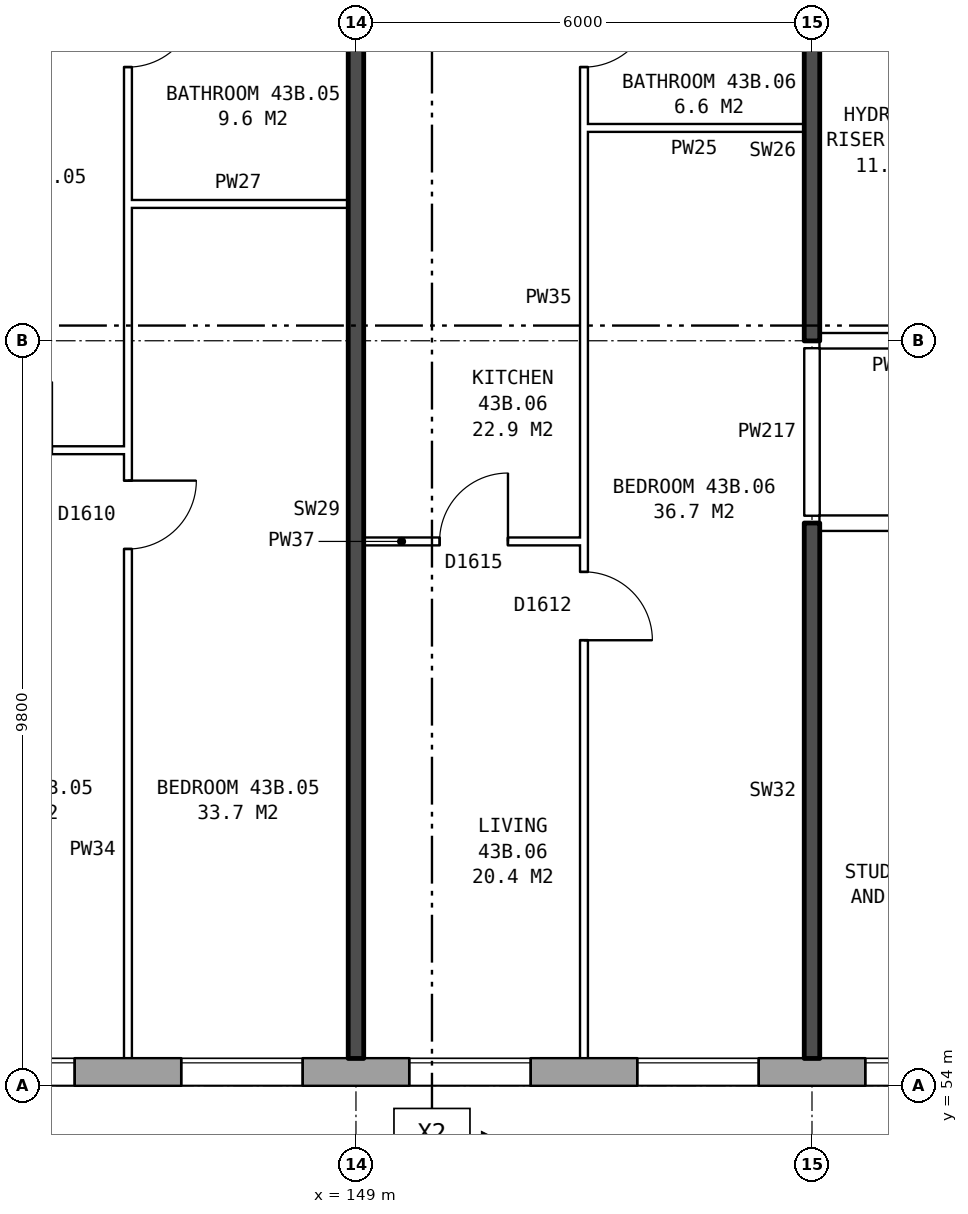
"""IFC4 building model, lengths in metres.
Left out: names, types, materials, properties, quantities, classifications, styles, units other than length and angle.
Written with IfcOpenShell. Run it as: python <this file> out.ifc"""

import sys

from ifc_helpers import new_model, si_unit, direction, frame, frame_2d, origin, place, context, subcontext, project, spatial, rectangle, extrude, element, fill, save


model = new_model("IFC4")
c1 = context("Model", 3, precision=1e-05, world=origin(), true_north=direction((0.0, 1.0)))
c2 = subcontext(c1, "Body", "Model", "MODEL_VIEW")
j1 = project(units=[si_unit("LENGTHUNIT", "METRE"), si_unit("PLANEANGLEUNIT", "RADIAN")], contexts=[c1])
p1 = place(None, origin())
s1 = spatial("IfcSite", under=j1, at=p1, CompositionType="ELEMENT")
p2 = place(p1, origin())
s2 = spatial("IfcBuilding", under=s1, at=p2, CompositionType="ELEMENT")
p3 = place(p2, frame((0.0, 0.0, 154.7)))
s3 = spatial("IfcBuildingStorey", under=s2, at=p3, CompositionType="ELEMENT", Elevation=154.7)
p4 = place(p3, frame((134.075, 54.18, 0.0), z_axis=(0.0, 0.0, 1.0), x_axis=(1.0, 0.0, 0.0)))
e1 = element("IfcWall", 1, at=p4, inside=s3, PredefinedType="STANDARD", context=c2, shape_type="SweptSolid", body=[
    extrude(rectangle(XDim=34.351, YDim=0.36, at=frame_2d((17.175, 0.0))), origin(), (0.0, 0.0, 1.0), 2.85),
])
p5 = place(p4, frame((0.625, 0.0, 0.8)))
e2 = element("IfcOpeningElement", 2, at=p5, cuts=e1, PredefinedType="OPENING", context=c2, shape_type="SweptSolid", body=[
    extrude(rectangle(XDim=1.6, YDim=1.8, at=frame_2d((0.8, 0.9))), frame((0.0, 0.19, 0.0), z_axis=(0.0, -1.0, 0.0), x_axis=(1.0, 0.0, 0.0)), (0.0, 0.0, 1.0), 0.38),
])
p6 = place(p4, frame((3.125, 0.0, 0.8)))
e3 = element("IfcOpeningElement", 3, at=p6, cuts=e1, PredefinedType="OPENING", context=c2, shape_type="SweptSolid", body=[
    extrude(rectangle(XDim=1.2, YDim=1.8, at=frame_2d((0.6, 0.9))), frame((0.0, 0.19, 0.0), z_axis=(0.0, -1.0, 0.0), x_axis=(1.0, 0.0, 0.0)), (0.0, 0.0, 1.0), 0.38),
])
p7 = place(p4, frame((4.625, 0.0, 1.7)))
e4 = element("IfcOpeningElement", 4, at=p7, cuts=e1, PredefinedType="OPENING", context=c2, shape_type="SweptSolid", body=[
    extrude(rectangle(XDim=0.8, YDim=0.9, at=frame_2d((0.4, 0.45))), frame((0.0, 0.19, 0.0), z_axis=(0.0, -1.0, 0.0), x_axis=(1.0, 0.0, 0.0)), (0.0, 0.0, 1.0), 0.38),
])
p8 = place(p4, frame((9.625, 0.0, 0.8)))
e5 = element("IfcOpeningElement", 5, at=p8, cuts=e1, PredefinedType="OPENING", context=c2, shape_type="SweptSolid", body=[
    extrude(rectangle(XDim=1.6, YDim=1.8, at=frame_2d((0.8, 0.9))), frame((0.0, 0.19, 0.0), z_axis=(0.0, -1.0, 0.0), x_axis=(1.0, 0.0, 0.0)), (0.0, 0.0, 1.0), 0.38),
])
p9 = place(p4, frame((12.625, 0.0, 0.8)))
e6 = element("IfcOpeningElement", 6, at=p9, cuts=e1, PredefinedType="OPENING", context=c2, shape_type="SweptSolid", body=[
    extrude(rectangle(XDim=1.6, YDim=1.8, at=frame_2d((0.8, 0.9))), frame((0.0, 0.19, 0.0), z_axis=(0.0, -1.0, 0.0), x_axis=(1.0, 0.0, 0.0)), (0.0, 0.0, 1.0), 0.38),
])
p10 = place(p4, frame((15.625, 0.0, 0.8)))
e7 = element("IfcOpeningElement", 7, at=p10, cuts=e1, PredefinedType="OPENING", context=c2, shape_type="SweptSolid", body=[
    extrude(rectangle(XDim=1.6, YDim=1.8, at=frame_2d((0.8, 0.9))), frame((0.0, 0.19, 0.0), z_axis=(0.0, -1.0, 0.0), x_axis=(1.0, 0.0, 0.0)), (0.0, 0.0, 1.0), 0.38),
])
p11 = place(p4, frame((18.625, 0.0, 0.8)))
e8 = element("IfcOpeningElement", 8, at=p11, cuts=e1, PredefinedType="OPENING", context=c2, shape_type="SweptSolid", body=[
    extrude(rectangle(XDim=1.6, YDim=1.8, at=frame_2d((0.8, 0.9))), frame((0.0, 0.19, 0.0), z_axis=(0.0, -1.0, 0.0), x_axis=(1.0, 0.0, 0.0)), (0.0, 0.0, 1.0), 0.38),
])
p12 = place(p4, frame((21.625, 0.0, 0.8)))
e9 = element("IfcOpeningElement", 9, at=p12, cuts=e1, PredefinedType="OPENING", context=c2, shape_type="SweptSolid", body=[
    extrude(rectangle(XDim=1.6, YDim=1.8, at=frame_2d((0.8, 0.9))), frame((0.0, 0.19, 0.0), z_axis=(0.0, -1.0, 0.0), x_axis=(1.0, 0.0, 0.0)), (0.0, 0.0, 1.0), 0.38),
])
p13 = place(p4, frame((24.625, 0.0, 0.8)))
e10 = element("IfcOpeningElement", 10, at=p13, cuts=e1, PredefinedType="OPENING", context=c2, shape_type="SweptSolid", body=[
    extrude(rectangle(XDim=1.6, YDim=1.8, at=frame_2d((0.8, 0.9))), frame((0.0, 0.19, 0.0), z_axis=(0.0, -1.0, 0.0), x_axis=(1.0, 0.0, 0.0)), (0.0, 0.0, 1.0), 0.38),
])
p14 = place(p4, frame((27.125, 0.0, 0.8)))
e11 = element("IfcOpeningElement", 11, at=p14, cuts=e1, PredefinedType="OPENING", context=c2, shape_type="SweptSolid", body=[
    extrude(rectangle(XDim=0.6, YDim=0.9, at=frame_2d((0.3, 0.45))), frame((0.0, 0.19, 0.0), z_axis=(0.0, -1.0, 0.0), x_axis=(1.0, 0.0, 0.0)), (0.0, 0.0, 1.0), 0.38),
])
p15 = place(p4, frame((30.625, 0.0, 0.8)))
e12 = element("IfcOpeningElement", 12, at=p15, cuts=e1, PredefinedType="OPENING", context=c2, shape_type="SweptSolid", body=[
    extrude(rectangle(XDim=1.6, YDim=1.8, at=frame_2d((0.8, 0.9))), frame((0.0, 0.19, 0.0), z_axis=(0.0, -1.0, 0.0), x_axis=(1.0, 0.0, 0.0)), (0.0, 0.0, 1.0), 0.38),
])
p16 = place(p4, frame((6.625, 0.0, 0.8)))
e13 = element("IfcOpeningElement", 13, at=p16, cuts=e1, PredefinedType="OPENING", context=c2, shape_type="SweptSolid", body=[
    extrude(rectangle(XDim=0.8, YDim=0.9, at=frame_2d((0.4, 0.45))), frame((0.0, 0.19, 0.0), z_axis=(0.0, -1.0, 0.0), x_axis=(1.0, 0.0, 0.0)), (0.0, 0.0, 1.0), 0.38),
])
p17 = place(p4, frame((7.725, 0.0, 0.8)))
e14 = element("IfcOpeningElement", 14, at=p17, cuts=e1, PredefinedType="OPENING", context=c2, shape_type="SweptSolid", body=[
    extrude(rectangle(XDim=1.0, YDim=1.8, at=frame_2d((0.5, 0.9))), frame((0.0, 0.19, 0.0), z_axis=(0.0, -1.0, 0.0), x_axis=(1.0, 0.0, 0.0)), (0.0, 0.0, 1.0), 0.38),
])
p18 = place(p4, frame((28.925, 0.0, 1.7)))
e15 = element("IfcOpeningElement", 15, at=p18, cuts=e1, PredefinedType="OPENING", context=c2, shape_type="SweptSolid", body=[
    extrude(rectangle(XDim=1.4, YDim=0.9, at=frame_2d((0.7, 0.45))), frame((0.0, 0.19, 0.0), z_axis=(0.0, -1.0, 0.0), x_axis=(1.0, 0.0, 0.0)), (0.0, 0.0, 1.0), 0.38),
])
p19 = place(p3, frame((149.1, 61.16, 0.0), z_axis=(0.0, 0.0, 1.0), x_axis=(1.0, 0.0, 0.0)))
e16 = element("IfcWall", 16, at=p19, inside=s3, PredefinedType="PARTITIONING", context=c2, shape_type="SweptSolid", body=[
    extrude(rectangle(XDim=2.9, YDim=0.1, at=frame_2d((1.45, 0.0))), origin(), (0.0, 0.0, 1.0), 2.85),
])
p20 = place(p19, frame((1.0, 0.0, 0.0)))
e17 = element("IfcOpeningElement", 17, at=p20, cuts=e16, PredefinedType="OPENING", context=c2, shape_type="SweptSolid", body=[
    extrude(rectangle(XDim=0.9, YDim=2.1, at=frame_2d((0.45, 1.05))), frame((0.0, 0.06, 0.0), z_axis=(0.0, -1.0, 0.0), x_axis=(1.0, 0.0, 0.0)), (0.0, 0.0, 1.0), 0.12),
])
p21 = place(p3, frame((155.1, 61.4, 0.0), z_axis=(0.0, 0.0, 1.0), x_axis=(1.0, 0.0, 0.0)))
e18 = element("IfcWall", 18, at=p21, inside=s3, PredefinedType="PARTITIONING", context=c2, shape_type="SweptSolid", body=[
    extrude(rectangle(XDim=16.04, YDim=0.2, at=frame_2d((8.02, 0.0))), origin(), (0.0, 0.0, 1.0), 2.85),
])
p22 = place(p21, frame((1.45, 0.0, 0.0)))
e19 = element("IfcOpeningElement", 19, at=p22, cuts=e18, PredefinedType="OPENING", context=c2, shape_type="SweptSolid", body=[
    extrude(rectangle(XDim=1.0, YDim=2.1, at=frame_2d((0.5, 1.05))), frame((0.0, 0.11, 0.0), z_axis=(0.0, -1.0, 0.0), x_axis=(1.0, 0.0, 0.0)), (0.0, 0.0, 1.0), 0.22),
])
p23 = place(p21, frame((8.4, 0.0, 0.0)))
e20 = element("IfcOpeningElement", 20, at=p23, cuts=e18, PredefinedType="OPENING", context=c2, shape_type="SweptSolid", body=[
    extrude(rectangle(XDim=1.0, YDim=2.1, at=frame_2d((0.5, 1.05))), frame((0.0, 0.11, 0.0), z_axis=(0.0, -1.0, 0.0), x_axis=(1.0, 0.0, 0.0)), (0.0, 0.0, 1.0), 0.22),
])
p24 = place(p3, frame((143.1, 62.36, 0.0), z_axis=(0.0, 0.0, 1.0), x_axis=(1.0, 0.0, 0.0)))
e21 = element("IfcWall", 21, at=p24, inside=s3, PredefinedType="PARTITIONING", context=c2, shape_type="SweptSolid", body=[
    extrude(rectangle(XDim=2.9, YDim=0.1, at=frame_2d((1.45, 0.0))), origin(), (0.0, 0.0, 1.0), 2.85),
])
p25 = place(p24, frame((1.0, 0.0, 0.0)))
e22 = element("IfcOpeningElement", 22, at=p25, cuts=e21, PredefinedType="OPENING", context=c2, shape_type="SweptSolid", body=[
    extrude(rectangle(XDim=0.9, YDim=2.1, at=frame_2d((0.45, 1.05))), frame((0.0, 0.06, 0.0), z_axis=(0.0, -1.0, 0.0), x_axis=(1.0, 0.0, 0.0)), (0.0, 0.0, 1.0), 0.12),
])
p26 = place(p3, frame((155.1, 63.8, 0.0), z_axis=(0.0, 0.0, 1.0), x_axis=(1.0, 0.0, 0.0)))
e23 = element("IfcWall", 23, at=p26, inside=s3, PredefinedType="PARTITIONING", context=c2, shape_type="SweptSolid", body=[
    extrude(rectangle(XDim=2.14, YDim=0.2, at=frame_2d((1.07, 0.0))), origin(), (0.0, 0.0, 1.0), 2.85),
])
for number, where, z_axis, x_axis in (
    (24, (146.0, 65.6, 0.0), (0.0, 0.0, 1.0), (1.0, 0.0, 0.0)),
    (25, (152.0, 66.6, 0.0), (0.0, 0.0, 1.0), (1.0, 0.0, 0.0)),
):
    element("IfcWall", number, at=place(p3, frame(where, z_axis=z_axis, x_axis=x_axis)), inside=s3, PredefinedType="PARTITIONING", context=c2, shape_type="SweptSolid", body=[
        extrude(rectangle(XDim=2.9, YDim=0.1, at=frame_2d((1.45, 0.0))), origin(), (0.0, 0.0, 1.0), 2.85),
    ])
p27 = place(p3, frame((146.0, 54.36, 0.0), z_axis=(0.0, 0.0, 1.0), x_axis=(0.0, 1.0, 0.0)))
e26 = element("IfcWall", 26, at=p27, inside=s3, PredefinedType="PARTITIONING", context=c2, shape_type="SweptSolid", body=[
    extrude(rectangle(XDim=14.34, YDim=0.1, at=frame_2d((7.17, 0.0))), origin(), (0.0, 0.0, 1.0), 2.85),
])
p28 = place(p27, frame((6.7, 0.0, 0.0)))
e27 = element("IfcOpeningElement", 27, at=p28, cuts=e26, PredefinedType="OPENING", context=c2, shape_type="SweptSolid", body=[
    extrude(rectangle(XDim=0.9, YDim=2.1, at=frame_2d((0.45, 1.05))), frame((0.0, 0.06, 0.0), z_axis=(0.0, -1.0, 0.0), x_axis=(1.0, 0.0, 0.0)), (0.0, 0.0, 1.0), 0.12),
])
p29 = place(p27, frame((13.04, 0.0, 0.0)))
e28 = element("IfcOpeningElement", 28, at=p29, cuts=e26, PredefinedType="OPENING", context=c2, shape_type="SweptSolid", body=[
    extrude(rectangle(XDim=0.9, YDim=2.1, at=frame_2d((0.45, 1.05))), frame((0.0, 0.06, 0.0), z_axis=(0.0, -1.0, 0.0), x_axis=(1.0, 0.0, 0.0)), (0.0, 0.0, 1.0), 0.12),
])
p30 = place(p3, frame((149.0, 54.36, 0.0), z_axis=(0.0, 0.0, 1.0), x_axis=(0.0, 1.0, 0.0)))
e29 = element("IfcWall", 29, at=p30, inside=s3, PredefinedType="SOLIDWALL", context=c2, shape_type="SweptSolid", body=[
    extrude(rectangle(XDim=14.44, YDim=0.2, at=frame_2d((7.22, 0.0))), origin(), (0.0, 0.0, 1.0), 2.85),
])
p31 = place(p3, frame((152.0, 54.36, 0.0), z_axis=(0.0, 0.0, 1.0), x_axis=(0.0, 1.0, 0.0)))
e30 = element("IfcWall", 30, at=p31, inside=s3, PredefinedType="PARTITIONING", context=c2, shape_type="SweptSolid", body=[
    extrude(rectangle(XDim=14.34, YDim=0.1, at=frame_2d((7.17, 0.0))), origin(), (0.0, 0.0, 1.0), 2.85),
])
p32 = place(p31, frame((5.5, 0.0, 0.0)))
e31 = element("IfcOpeningElement", 31, at=p32, cuts=e30, PredefinedType="OPENING", context=c2, shape_type="SweptSolid", body=[
    extrude(rectangle(XDim=0.9, YDim=2.1, at=frame_2d((0.45, 1.05))), frame((0.0, 0.06, 0.0), z_axis=(0.0, -1.0, 0.0), x_axis=(1.0, 0.0, 0.0)), (0.0, 0.0, 1.0), 0.12),
])
p33 = place(p31, frame((13.04, 0.0, 0.0)))
e32 = element("IfcOpeningElement", 32, at=p33, cuts=e30, PredefinedType="OPENING", context=c2, shape_type="SweptSolid", body=[
    extrude(rectangle(XDim=0.9, YDim=2.1, at=frame_2d((0.45, 1.05))), frame((0.0, 0.06, 0.0), z_axis=(0.0, -1.0, 0.0), x_axis=(1.0, 0.0, 0.0)), (0.0, 0.0, 1.0), 0.12),
])
p34 = place(p3, frame((155.0, 54.36, 0.0), z_axis=(0.0, 0.0, 1.0), x_axis=(0.0, 1.0, 0.0)))
e33 = element("IfcWall", 33, at=p34, inside=s3, PredefinedType="SOLIDWALL", context=c2, shape_type="SweptSolid", body=[
    extrude(rectangle(XDim=7.04, YDim=0.2, at=frame_2d((3.52, 0.0))), origin(), (0.0, 0.0, 1.0), 2.85),
])
p35 = place(p3, frame((155.0, 61.5, 0.0), z_axis=(0.0, 0.0, 1.0), x_axis=(0.0, 1.0, 0.0)))
e34 = element("IfcWall", 34, at=p35, inside=s3, PredefinedType="PARTITIONING", context=c2, shape_type="SweptSolid", body=[
    extrude(rectangle(XDim=2.2, YDim=0.2, at=frame_2d((1.1, 0.0))), origin(), (0.0, 0.0, 1.0), 2.85),
])
p36 = place(p3, frame((155.0, 63.8, 0.0), z_axis=(0.0, 0.0, 1.0), x_axis=(0.0, 1.0, 0.0)))
e35 = element("IfcWall", 35, at=p36, inside=s3, PredefinedType="SOLIDWALL", context=c2, shape_type="SweptSolid", body=[
    extrude(rectangle(XDim=5.0, YDim=0.2, at=frame_2d((2.5, 0.0))), origin(), (0.0, 0.0, 1.0), 2.85),
])
p37 = place(p8, origin())
e36 = element("IfcWindow", 36, at=p37, inside=s3, PartitioningType="SINGLE_PANEL", PredefinedType="WINDOW", context=c2, shape_type="SweptSolid", body=[
    extrude(rectangle(XDim=1.6, YDim=1.8, at=frame_2d((0.8, 0.9))), frame((0.0, 0.15, 0.0), z_axis=(0.0, -1.0, 0.0), x_axis=(1.0, 0.0, 0.0)), (0.0, 0.0, 1.0), 0.06),
])
fill(e5, e36)
p38 = place(p9, origin())
e37 = element("IfcWindow", 37, at=p38, inside=s3, PartitioningType="SINGLE_PANEL", PredefinedType="WINDOW", context=c2, shape_type="SweptSolid", body=[
    extrude(rectangle(XDim=1.6, YDim=1.8, at=frame_2d((0.8, 0.9))), frame((0.0, 0.15, 0.0), z_axis=(0.0, -1.0, 0.0), x_axis=(1.0, 0.0, 0.0)), (0.0, 0.0, 1.0), 0.06),
])
fill(e6, e37)
p39 = place(p10, origin())
e38 = element("IfcWindow", 38, at=p39, inside=s3, PartitioningType="SINGLE_PANEL", PredefinedType="WINDOW", context=c2, shape_type="SweptSolid", body=[
    extrude(rectangle(XDim=1.6, YDim=1.8, at=frame_2d((0.8, 0.9))), frame((0.0, 0.15, 0.0), z_axis=(0.0, -1.0, 0.0), x_axis=(1.0, 0.0, 0.0)), (0.0, 0.0, 1.0), 0.06),
])
fill(e7, e38)
p40 = place(p11, origin())
e39 = element("IfcWindow", 39, at=p40, inside=s3, PartitioningType="SINGLE_PANEL", PredefinedType="WINDOW", context=c2, shape_type="SweptSolid", body=[
    extrude(rectangle(XDim=1.6, YDim=1.8, at=frame_2d((0.8, 0.9))), frame((0.0, 0.15, 0.0), z_axis=(0.0, -1.0, 0.0), x_axis=(1.0, 0.0, 0.0)), (0.0, 0.0, 1.0), 0.06),
])
fill(e8, e39)
p41 = place(p12, origin())
e40 = element("IfcWindow", 40, at=p41, inside=s3, PartitioningType="SINGLE_PANEL", PredefinedType="WINDOW", context=c2, shape_type="SweptSolid", body=[
    extrude(rectangle(XDim=1.6, YDim=1.8, at=frame_2d((0.8, 0.9))), frame((0.0, 0.15, 0.0), z_axis=(0.0, -1.0, 0.0), x_axis=(1.0, 0.0, 0.0)), (0.0, 0.0, 1.0), 0.06),
])
fill(e9, e40)
p42 = place(p28, frame((0.9, 0.0, 0.0), z_axis=(0.0, 0.0, 1.0), x_axis=(-1.0, 0.0, 0.0)))
e41 = element("IfcDoor", 41, at=p42, inside=s3, OperationType="SINGLE_SWING_LEFT", PredefinedType="DOOR", context=c2, shape_type="SweptSolid", body=[
    extrude(rectangle(XDim=0.9, YDim=2.1, at=frame_2d((0.45, 1.05))), frame((0.0, 0.025, 0.0), z_axis=(0.0, -1.0, 0.0), x_axis=(1.0, 0.0, 0.0)), (0.0, 0.0, 1.0), 0.05),
])
fill(e27, e41)
p43 = place(p29, frame((0.9, 0.0, 0.0), z_axis=(0.0, 0.0, 1.0), x_axis=(-1.0, 0.0, 0.0)))
e42 = element("IfcDoor", 42, at=p43, inside=s3, OperationType="SINGLE_SWING_LEFT", PredefinedType="DOOR", context=c2, shape_type="SweptSolid", body=[
    extrude(rectangle(XDim=0.9, YDim=2.1, at=frame_2d((0.45, 1.05))), frame((0.0, 0.025, 0.0), z_axis=(0.0, -1.0, 0.0), x_axis=(1.0, 0.0, 0.0)), (0.0, 0.0, 1.0), 0.05),
])
fill(e28, e42)
p44 = place(p32, frame((0.9, 0.0, 0.0), z_axis=(0.0, 0.0, 1.0), x_axis=(-1.0, 0.0, 0.0)))
e43 = element("IfcDoor", 43, at=p44, inside=s3, OperationType="SINGLE_SWING_RIGHT", PredefinedType="DOOR", context=c2, shape_type="SweptSolid", body=[
    extrude(rectangle(XDim=0.9, YDim=2.1, at=frame_2d((0.45, 1.05))), frame((0.0, 0.025, 0.0), z_axis=(0.0, -1.0, 0.0), x_axis=(1.0, 0.0, 0.0)), (0.0, 0.0, 1.0), 0.05),
])
fill(e31, e43)
p45 = place(p20, origin())
e44 = element("IfcDoor", 44, at=p45, inside=s3, OperationType="SINGLE_SWING_RIGHT", PredefinedType="DOOR", context=c2, shape_type="SweptSolid", body=[
    extrude(rectangle(XDim=0.9, YDim=2.1, at=frame_2d((0.45, 1.05))), frame((0.0, 0.025, 0.0), z_axis=(0.0, -1.0, 0.0), x_axis=(1.0, 0.0, 0.0)), (0.0, 0.0, 1.0), 0.05),
])
fill(e17, e44)
p46 = place(p33, frame((0.9, 0.0, 0.0), z_axis=(0.0, 0.0, 1.0), x_axis=(-1.0, 0.0, 0.0)))
e45 = element("IfcDoor", 45, at=p46, inside=s3, OperationType="SINGLE_SWING_LEFT", PredefinedType="DOOR", context=c2, shape_type="SweptSolid", body=[
    extrude(rectangle(XDim=0.9, YDim=2.1, at=frame_2d((0.45, 1.05))), frame((0.0, 0.025, 0.0), z_axis=(0.0, -1.0, 0.0), x_axis=(1.0, 0.0, 0.0)), (0.0, 0.0, 1.0), 0.05),
])
fill(e32, e45)
save(model, sys.argv[1])
